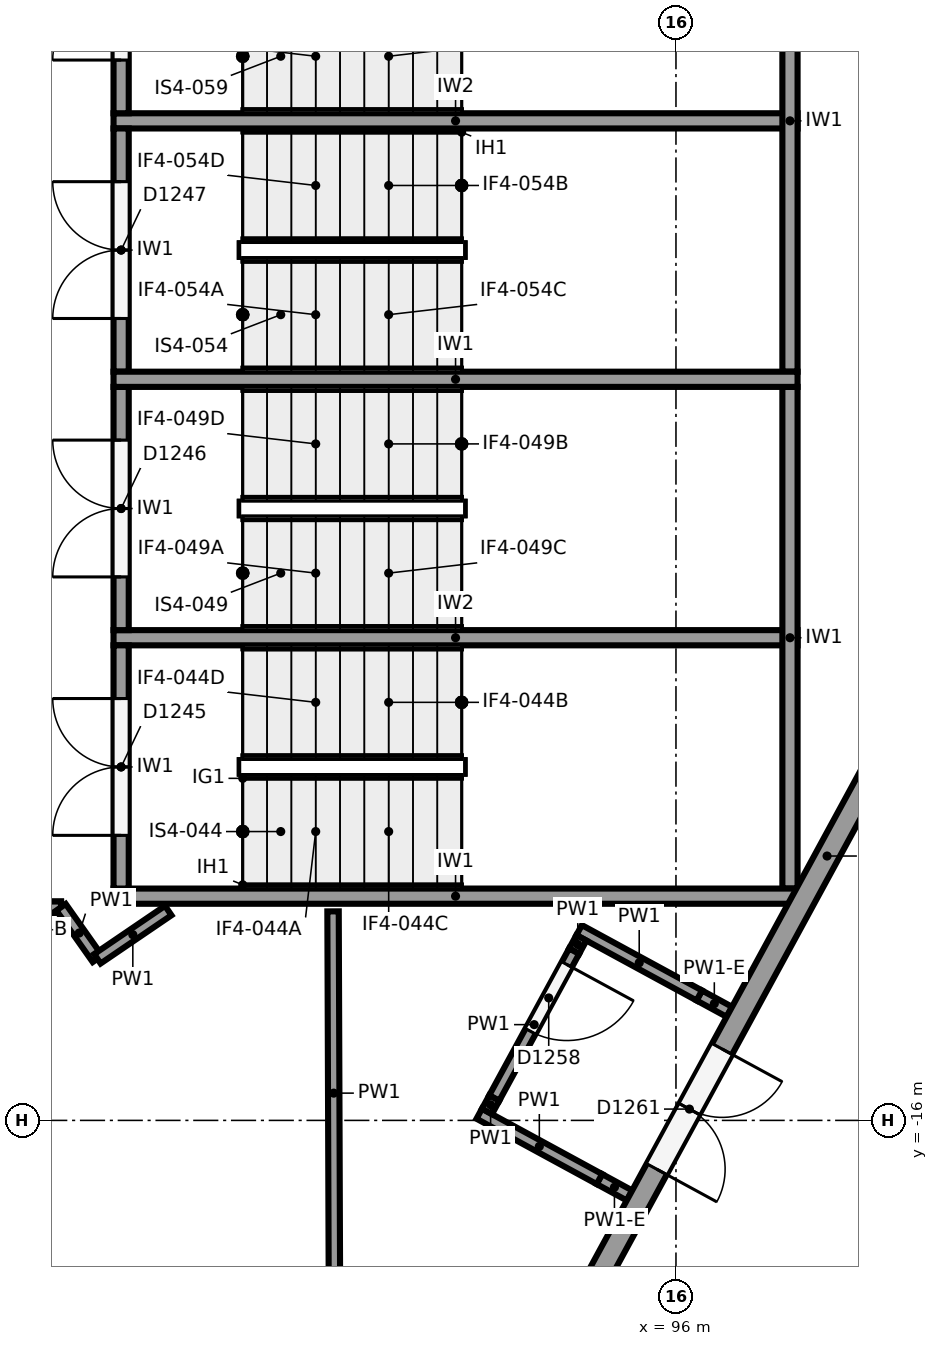
"""IFC4 building model, lengths in metres.
Left out: names, types, materials, properties, quantities, classifications, styles, units other than length and angle.
Written with IfcOpenShell. Run it as: python <this file> out.ifc"""

import sys

from ifc_helpers import new_model, si_unit, direction, frame, frame_2d, origin, place, context, subcontext, project, spatial, rectangle, extrude, element, fill, save


model = new_model("IFC4")
c1 = context("Model", 3, precision=1e-05, world=origin(), true_north=direction((0.0, 1.0)))
c2 = subcontext(c1, "Body", "Model", "MODEL_VIEW")
j1 = project(units=[si_unit("LENGTHUNIT", "METRE"), si_unit("PLANEANGLEUNIT", "RADIAN")], contexts=[c1])
p1 = place(None, origin())
s1 = spatial("IfcSite", under=j1, at=p1, CompositionType="ELEMENT")
p2 = place(p1, origin())
s2 = spatial("IfcBuilding", under=s1, at=p2, CompositionType="ELEMENT")
p3 = place(p2, frame((0.0, 0.0, 12.0)))
s3 = spatial("IfcBuildingStorey", under=s2, at=p3, CompositionType="ELEMENT", Elevation=12.0)
p4 = place(p3, frame((101.161, -6.689, 0.0), z_axis=(0.0, 0.0, 1.0), x_axis=(-0.477867771117, -0.878431780691, 0.0)))
e1 = element("IfcWall", 1, at=p4, inside=s3, PredefinedType="SOLIDWALL", context=c2, shape_type="SweptSolid", body=[
    extrude(rectangle(XDim=13.28, YDim=0.3, at=frame_2d((6.64, 0.0))), origin(), (0.0, 0.0, 1.0), 4.35),
])
p5 = place(p4, frame((9.53, 0.0, 0.0)))
e2 = element("IfcOpeningElement", 2, at=p5, cuts=e1, PredefinedType="OPENING", context=c2, shape_type="SweptSolid", body=[
    extrude(rectangle(XDim=1.8, YDim=2.4, at=frame_2d((0.9, 1.2))), frame((0.0, 0.16, 0.0), z_axis=(0.0, -1.0, 0.0), x_axis=(1.0, 0.0, 0.0)), (0.0, 0.0, 1.0), 0.32),
])
p6 = place(p3, frame((94.815, 5.855, 0.0), z_axis=(0.0, 0.0, 1.0), x_axis=(0.477867771117, -0.878431780691, 0.0)))
e3 = element("IfcWall", 3, at=p6, inside=s3, PredefinedType="SOLIDWALL", context=c2, shape_type="SweptSolid", body=[
    extrude(rectangle(XDim=13.28, YDim=0.35, at=frame_2d((6.64, 0.0))), origin(), (0.0, 0.0, 1.0), 4.35),
])
p7 = place(p6, frame((0.75, 0.0, 1.0)))
e4 = element("IfcOpeningElement", 4, at=p7, cuts=e3, PredefinedType="OPENING", context=c2, shape_type="SweptSolid", body=[
    extrude(rectangle(XDim=0.9, YDim=3.25, at=frame_2d((0.45, 1.625))), frame((0.0, 0.185, 0.0), z_axis=(0.0, -1.0, 0.0), x_axis=(1.0, 0.0, 0.0)), (0.0, 0.0, 1.0), 0.37),
])
p8 = place(p6, frame((2.85, 0.0, 1.0)))
e5 = element("IfcOpeningElement", 5, at=p8, cuts=e3, PredefinedType="OPENING", context=c2, shape_type="SweptSolid", body=[
    extrude(rectangle(XDim=0.9, YDim=3.25, at=frame_2d((0.45, 1.625))), frame((0.0, 0.185, 0.0), z_axis=(0.0, -1.0, 0.0), x_axis=(1.0, 0.0, 0.0)), (0.0, 0.0, 1.0), 0.37),
])
p9 = place(p6, frame((11.25, 0.0, 1.0)))
e6 = element("IfcOpeningElement", 6, at=p9, cuts=e3, PredefinedType="OPENING", context=c2, shape_type="SweptSolid", body=[
    extrude(rectangle(XDim=0.9, YDim=3.25, at=frame_2d((0.45, 1.625))), frame((0.0, 0.185, 0.0), z_axis=(0.0, -1.0, 0.0), x_axis=(1.0, 0.0, 0.0)), (0.0, 0.0, 1.0), 0.37),
])
for number, where, z_axis, x_axis in (
    (7, (97.6, -13.05, 0.0), (0.0, 0.0, 1.0), (-1.0, 0.0, 0.0)),
    (8, (97.6, -6.25, 0.0), (0.0, 0.0, 1.0), (-1.0, 0.0, 0.0)),
):
    element("IfcWall", number, at=place(p3, frame(where, z_axis=z_axis, x_axis=x_axis)), inside=s3, PredefinedType="SHEAR", context=c2, shape_type="SweptSolid", body=[
        extrude(rectangle(XDim=9.0, YDim=0.2, at=frame_2d((4.5, 0.0))), origin(), (0.0, 0.0, 1.0), 5.65),
    ])
for number, where, z_axis, x_axis in (
    (9, (97.5, -12.95, 0.0), (0.0, 0.0, 1.0), (0.0, 1.0, 0.0)),
    (10, (97.5, -6.15, 0.0), (0.0, 0.0, 1.0), (0.0, 1.0, 0.0)),
):
    element("IfcWall", number, at=place(p3, frame(where, z_axis=z_axis, x_axis=x_axis)), inside=s3, PredefinedType="SHEAR", context=c2, shape_type="SweptSolid", body=[
        extrude(rectangle(XDim=6.6, YDim=0.2, at=frame_2d((3.3, 0.0))), origin(), (0.0, 0.0, 1.0), 5.65),
    ])
for number, where, z_axis, x_axis in (
    (11, (97.6, -9.65, 0.0), (0.0, 0.0, 1.0), (-1.0, 0.0, 0.0)),
    (12, (97.6, -2.85, 0.0), (0.0, 0.0, 1.0), (-1.0, 0.0, 0.0)),
):
    element("IfcWall", number, at=place(p3, frame(where, z_axis=z_axis, x_axis=x_axis)), inside=s3, PredefinedType="SHEAR", context=c2, shape_type="SweptSolid", body=[
        extrude(rectangle(XDim=9.0, YDim=0.2, at=frame_2d((4.5, 0.0))), origin(), (0.0, 0.0, 1.0), 5.65),
    ])
p10 = place(p3, frame((88.7, -12.95, 0.0), z_axis=(0.0, 0.0, 1.0), x_axis=(0.0, 1.0, 0.0)))
e13 = element("IfcWall", 13, at=p10, inside=s3, PredefinedType="SHEAR", context=c2, shape_type="SweptSolid", body=[
    extrude(rectangle(XDim=3.2, YDim=0.2, at=frame_2d((1.6, 0.0))), origin(), (0.0, 0.0, 1.0), 5.65),
])
p11 = place(p10, frame((0.7, 0.0, 0.0)))
e14 = element("IfcOpeningElement", 14, at=p11, cuts=e13, PredefinedType="OPENING", context=c2, shape_type="SweptSolid", body=[
    extrude(rectangle(XDim=1.8, YDim=2.1, at=frame_2d((0.9, 1.05))), frame((0.0, 0.11, 0.0), z_axis=(0.0, -1.0, 0.0), x_axis=(1.0, 0.0, 0.0)), (0.0, 0.0, 1.0), 0.22),
])
p12 = place(p3, frame((88.7, -9.55, 0.0), z_axis=(0.0, 0.0, 1.0), x_axis=(0.0, 1.0, 0.0)))
e15 = element("IfcWall", 15, at=p12, inside=s3, PredefinedType="SHEAR", context=c2, shape_type="SweptSolid", body=[
    extrude(rectangle(XDim=3.2, YDim=0.2, at=frame_2d((1.6, 0.0))), origin(), (0.0, 0.0, 1.0), 5.65),
])
p13 = place(p12, frame((0.7, 0.0, 0.0)))
e16 = element("IfcOpeningElement", 16, at=p13, cuts=e15, PredefinedType="OPENING", context=c2, shape_type="SweptSolid", body=[
    extrude(rectangle(XDim=1.8, YDim=2.1, at=frame_2d((0.9, 1.05))), frame((0.0, 0.11, 0.0), z_axis=(0.0, -1.0, 0.0), x_axis=(1.0, 0.0, 0.0)), (0.0, 0.0, 1.0), 0.22),
])
p14 = place(p3, frame((88.7, -6.15, 0.0), z_axis=(0.0, 0.0, 1.0), x_axis=(0.0, 1.0, 0.0)))
e17 = element("IfcWall", 17, at=p14, inside=s3, PredefinedType="SHEAR", context=c2, shape_type="SweptSolid", body=[
    extrude(rectangle(XDim=3.2, YDim=0.2, at=frame_2d((1.6, 0.0))), origin(), (0.0, 0.0, 1.0), 5.65),
])
p15 = place(p14, frame((0.7, 0.0, 0.0)))
e18 = element("IfcOpeningElement", 18, at=p15, cuts=e17, PredefinedType="OPENING", context=c2, shape_type="SweptSolid", body=[
    extrude(rectangle(XDim=1.8, YDim=2.1, at=frame_2d((0.9, 1.05))), frame((0.0, 0.11, 0.0), z_axis=(0.0, -1.0, 0.0), x_axis=(1.0, 0.0, 0.0)), (0.0, 0.0, 1.0), 0.22),
])
p16 = place(p3, frame((88.7, -2.75, 0.0), z_axis=(0.0, 0.0, 1.0), x_axis=(0.0, 1.0, 0.0)))
e19 = element("IfcWall", 19, at=p16, inside=s3, PredefinedType="SHEAR", context=c2, shape_type="SweptSolid", body=[
    extrude(rectangle(XDim=3.2, YDim=0.2, at=frame_2d((1.6, 0.0))), origin(), (0.0, 0.0, 1.0), 5.65),
])
p17 = place(p16, frame((0.7, 0.0, 0.0)))
e20 = element("IfcOpeningElement", 20, at=p17, cuts=e19, PredefinedType="OPENING", context=c2, shape_type="SweptSolid", body=[
    extrude(rectangle(XDim=1.8, YDim=2.1, at=frame_2d((0.9, 1.05))), frame((0.0, 0.11, 0.0), z_axis=(0.0, -1.0, 0.0), x_axis=(1.0, 0.0, 0.0)), (0.0, 0.0, 1.0), 0.22),
])
p18 = place(p3, frame((91.506, -18.033, 0.0), z_axis=(0.0, 0.0, 1.0), x_axis=(-0.003624274308, 0.999993432296, 0.0)))
e21 = element("IfcWall", 21, at=p18, inside=s3, PredefinedType="PARTITIONING", context=c2, shape_type="SweptSolid", body=[
    extrude(rectangle(XDim=4.783, YDim=0.15, at=frame_2d((2.391, 0.0))), origin(), (0.0, 0.0, 1.0), 5.65),
])
p19 = place(p3, frame((81.555, -13.195, 0.0), z_axis=(0.0, 0.0, 1.0), x_axis=(0.999999999262, -3.8421639e-05, 0.0)))
e22 = element("IfcWall", 22, at=p19, inside=s3, PredefinedType="PARTITIONING", context=c2, shape_type="SweptSolid", body=[
    extrude(rectangle(XDim=6.354, YDim=0.15, at=frame_2d((3.177, 0.0))), origin(), (0.0, 0.0, 1.0), 4.55),
])
p20 = place(p19, frame((3.85, 0.0, 0.0)))
e23 = element("IfcOpeningElement", 23, at=p20, cuts=e22, PredefinedType="OPENING", context=c2, shape_type="SweptSolid", body=[
    extrude(rectangle(XDim=1.8, YDim=2.1, at=frame_2d((0.9, 1.05))), frame((0.0, 0.085, 0.0), z_axis=(0.0, -1.0, 0.0), x_axis=(1.0, 0.0, 0.0)), (0.0, 0.0, 1.0), 0.17),
])
p21 = place(p3, frame((87.255, -13.195, 4.55), z_axis=(0.0, 0.0, 1.0), x_axis=(1.0, 0.0, 0.0)))
e24 = element("IfcWall", 24, at=p21, inside=s3, PredefinedType="PARTITIONING", context=c2, shape_type="SweptSolid", body=[
    extrude(rectangle(XDim=0.654, YDim=0.15, at=frame_2d((0.327, 0.0))), origin(), (0.0, 0.0, 1.0), 1.1),
])
p22 = place(p3, frame((87.909, -13.195, 0.0), z_axis=(0.0, 0.0, 1.0), x_axis=(0.576359888906, -0.817195985342, 0.0)))
e25 = element("IfcWall", 25, at=p22, inside=s3, PredefinedType="PARTITIONING", context=c2, shape_type="SweptSolid", body=[
    extrude(rectangle(XDim=0.83, YDim=0.15, at=frame_2d((0.415, 0.0))), origin(), (0.0, 0.0, 1.0), 5.65),
])
p23 = place(p3, frame((88.388, -13.874, 0.0), z_axis=(0.0, 0.0, 1.0), x_axis=(0.826749248939, 0.562570599462, 0.0)))
e26 = element("IfcWall", 26, at=p23, inside=s3, PredefinedType="PARTITIONING", context=c2, shape_type="SweptSolid", body=[
    extrude(rectangle(XDim=1.127, YDim=0.15, at=frame_2d((0.564, 0.0))), origin(), (0.0, 0.0, 1.0), 5.65),
])
p24 = place(p3, frame((96.702, -14.572, 0.0), z_axis=(0.0, 0.0, 1.0), x_axis=(-0.878372019733, 0.477977609256, 0.0)))
e27 = element("IfcWall", 27, at=p24, inside=s3, PredefinedType="PARTITIONING", context=c2, shape_type="SweptSolid", body=[
    extrude(rectangle(XDim=0.45, YDim=0.15, at=frame_2d((0.225, 0.0))), origin(), (0.0, 0.0, 1.0), 4.35),
])
p25 = place(p3, frame((96.307, -14.357, 0.0), z_axis=(0.0, 0.0, 1.0), x_axis=(-0.878428962466, 0.477872951632, 0.0)))
e28 = element("IfcWall", 28, at=p25, inside=s3, PredefinedType="PARTITIONING", context=c2, shape_type="SweptSolid", body=[
    extrude(rectangle(XDim=1.8, YDim=0.15, at=frame_2d((0.9, 0.0))), origin(), (0.0, 0.0, 1.0), 5.65),
])
p26 = place(p3, frame((95.388, -16.987, 0.0), z_axis=(0.0, 0.0, 1.0), x_axis=(-0.878372019733, 0.477977609256, 0.0)))
e29 = element("IfcWall", 29, at=p26, inside=s3, PredefinedType="PARTITIONING", context=c2, shape_type="SweptSolid", body=[
    extrude(rectangle(XDim=0.45, YDim=0.15, at=frame_2d((0.225, 0.0))), origin(), (0.0, 0.0, 1.0), 4.35),
])
p27 = place(p3, frame((94.993, -16.772, 0.0), z_axis=(0.0, 0.0, 1.0), x_axis=(-0.878459932885, 0.477816017223, 0.0)))
e30 = element("IfcWall", 30, at=p27, inside=s3, PredefinedType="PARTITIONING", context=c2, shape_type="SweptSolid", body=[
    extrude(rectangle(XDim=1.8, YDim=0.15, at=frame_2d((0.9, 0.0))), origin(), (0.0, 0.0, 1.0), 5.65),
])
p28 = place(p3, frame((94.756, -13.598, 0.0), z_axis=(0.0, 0.0, 1.0), x_axis=(-0.478168266369, -0.878268244352, 0.0)))
e31 = element("IfcWall", 31, at=p28, inside=s3, PredefinedType="PARTITIONING", context=c2, shape_type="SweptSolid", body=[
    extrude(rectangle(XDim=0.2, YDim=0.15, at=frame_2d((0.1, 0.0))), origin(), (0.0, 0.0, 1.0), 5.65),
])
p29 = place(p3, frame((94.66, -13.774, 0.0), z_axis=(0.0, 0.0, 1.0), x_axis=(-0.477887643273, -0.878420969927, 0.0)))
e32 = element("IfcWall", 32, at=p29, inside=s3, PredefinedType="PARTITIONING", context=c2, shape_type="SweptSolid", body=[
    extrude(rectangle(XDim=2.2, YDim=0.15, at=frame_2d((1.1, 0.0))), origin(), (0.0, 0.0, 1.0), 5.65),
])
p30 = place(p29, frame((0.2, 0.0, 0.0)))
e33 = element("IfcOpeningElement", 33, at=p30, cuts=e32, PredefinedType="OPENING", context=c2, shape_type="SweptSolid", body=[
    extrude(rectangle(XDim=1.0, YDim=2.1, at=frame_2d((0.5, 1.05))), frame((0.0, 0.085, 0.0), z_axis=(0.0, -1.0, 0.0), x_axis=(1.0, 0.0, 0.0)), (0.0, 0.0, 1.0), 0.17),
])
p31 = place(p3, frame((93.609, -15.706, 0.0), z_axis=(0.0, 0.0, 1.0), x_axis=(-0.477226530971, -0.878780312785, 0.0)))
e34 = element("IfcWall", 34, at=p31, inside=s3, PredefinedType="PARTITIONING", context=c2, shape_type="SweptSolid", body=[
    extrude(rectangle(XDim=0.2, YDim=0.15, at=frame_2d((0.1, 0.0))), origin(), (0.0, 0.0, 1.0), 5.65),
])
p32 = place(p5, origin())
e35 = element("IfcDoor", 35, at=p32, inside=s3, OperationType="DOUBLE_DOOR_SINGLE_SWING", PredefinedType="DOOR", context=c2, shape_type="SweptSolid", body=[
    extrude(rectangle(XDim=1.8, YDim=2.4, at=frame_2d((0.9, 1.2))), frame((0.0, 0.025, 0.0), z_axis=(0.0, -1.0, 0.0), x_axis=(1.0, 0.0, 0.0)), (0.0, 0.0, 1.0), 0.05),
])
fill(e2, e35)
p33 = place(p11, origin())
e36 = element("IfcDoor", 36, at=p33, inside=s3, OperationType="DOUBLE_DOOR_SINGLE_SWING", PredefinedType="DOOR", context=c2, shape_type="SweptSolid", body=[
    extrude(rectangle(XDim=1.8, YDim=2.1, at=frame_2d((0.9, 1.05))), frame((0.0, 0.025, 0.0), z_axis=(0.0, -1.0, 0.0), x_axis=(1.0, 0.0, 0.0)), (0.0, 0.0, 1.0), 0.05),
])
fill(e14, e36)
p34 = place(p13, origin())
e37 = element("IfcDoor", 37, at=p34, inside=s3, OperationType="DOUBLE_DOOR_SINGLE_SWING", PredefinedType="DOOR", context=c2, shape_type="SweptSolid", body=[
    extrude(rectangle(XDim=1.8, YDim=2.1, at=frame_2d((0.9, 1.05))), frame((0.0, 0.025, 0.0), z_axis=(0.0, -1.0, 0.0), x_axis=(1.0, 0.0, 0.0)), (0.0, 0.0, 1.0), 0.05),
])
fill(e16, e37)
p35 = place(p15, origin())
e38 = element("IfcDoor", 38, at=p35, inside=s3, OperationType="DOUBLE_DOOR_SINGLE_SWING", PredefinedType="DOOR", context=c2, shape_type="SweptSolid", body=[
    extrude(rectangle(XDim=1.8, YDim=2.1, at=frame_2d((0.9, 1.05))), frame((0.0, 0.025, 0.0), z_axis=(0.0, -1.0, 0.0), x_axis=(1.0, 0.0, 0.0)), (0.0, 0.0, 1.0), 0.05),
])
fill(e18, e38)
p36 = place(p17, origin())
e39 = element("IfcDoor", 39, at=p36, inside=s3, OperationType="DOUBLE_DOOR_SINGLE_SWING", PredefinedType="DOOR", context=c2, shape_type="SweptSolid", body=[
    extrude(rectangle(XDim=1.8, YDim=2.1, at=frame_2d((0.9, 1.05))), frame((0.0, 0.025, 0.0), z_axis=(0.0, -1.0, 0.0), x_axis=(1.0, 0.0, 0.0)), (0.0, 0.0, 1.0), 0.05),
])
fill(e20, e39)
p37 = place(p30, origin())
e40 = element("IfcDoor", 40, at=p37, inside=s3, OperationType="SINGLE_SWING_LEFT", PredefinedType="DOOR", context=c2, shape_type="SweptSolid", body=[
    extrude(rectangle(XDim=1.0, YDim=2.1, at=frame_2d((0.5, 1.05))), frame((0.0, 0.025, 0.0), z_axis=(0.0, -1.0, 0.0), x_axis=(1.0, 0.0, 0.0)), (0.0, 0.0, 1.0), 0.05),
])
fill(e33, e40)
save(model, sys.argv[1])
